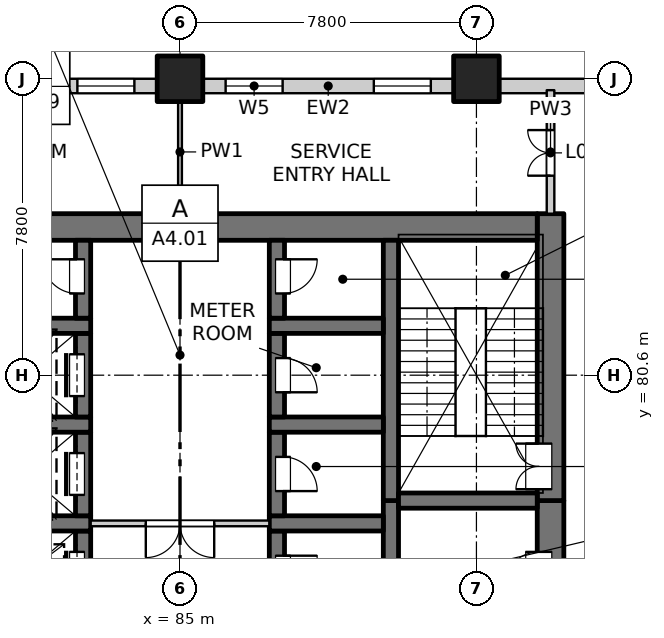
"""IFC4 building model, lengths in metres.
Left out: names, types, materials, properties, quantities, classifications, styles, units other than length and angle.
Written with IfcOpenShell. Run it as: python <this file> out.ifc"""

import sys

from ifc_helpers import new_model, si_unit, direction, frame, frame_2d, origin, origin_2d, place, context, subcontext, project, spatial, rectangle, extrude, element, fill, save


model = new_model("IFC4")
c1 = context("Model", 3, precision=1e-05, world=origin(), true_north=direction((0.0, 1.0)))
c2 = subcontext(c1, "Body", "Model", "MODEL_VIEW")
j1 = project(units=[si_unit("LENGTHUNIT", "METRE"), si_unit("PLANEANGLEUNIT", "RADIAN")], contexts=[c1])
p1 = place(None, origin())
s1 = spatial("IfcSite", under=j1, at=p1, CompositionType="ELEMENT")
p2 = place(p1, origin())
s2 = spatial("IfcBuilding", under=s1, at=p2, CompositionType="ELEMENT")
p3 = place(p2, frame((0.0, 0.0, 10.5)))
s3 = spatial("IfcBuildingStorey", under=s2, at=p3, CompositionType="ELEMENT", Elevation=10.5)
for number, where, z_axis, x_axis in (
    (1, (85.0, 88.4, -0.3), (0.0, 0.0, 1.0), (1.0, 0.0, 0.0)),
    (2, (92.8, 88.4, -0.3), (0.0, 0.0, 1.0), (1.0, 0.0, 0.0)),
):
    element("IfcColumn", number, at=place(p3, frame(where, z_axis=z_axis, x_axis=x_axis)), inside=s3, PredefinedType="COLUMN", context=c2, shape_type="SweptSolid", body=[
        extrude(rectangle(XDim=1.2, YDim=1.2, at=origin_2d()), origin(), (0.0, 0.0, 1.0), 4.45),
    ])
p4 = place(p3, frame((94.75, 61.95, -0.3), z_axis=(0.0, 0.0, 1.0), x_axis=(0.0, 1.0, 0.0)))
e3 = element("IfcWall", 3, at=p4, inside=s3, PredefinedType="SOLIDWALL", context=c2, shape_type="SweptSolid", body=[
    extrude(rectangle(XDim=15.35, YDim=0.7, at=frame_2d((7.675, 0.0))), origin(), (0.0, 0.0, 1.0), 4.45),
])
p5 = place(p4, frame((0.925, 0.0, 0.3)))
e4 = element("IfcOpeningElement", 4, at=p5, cuts=e3, PredefinedType="OPENING", context=c2, shape_type="SweptSolid", body=[
    extrude(rectangle(XDim=0.9, YDim=2.1, at=frame_2d((0.45, 1.05))), frame((0.0, 0.36, 0.0), z_axis=(0.0, -1.0, 0.0), x_axis=(1.0, 0.0, 0.0)), (0.0, 0.0, 1.0), 0.72),
])
p6 = place(p4, frame((3.8, 0.0, 0.3)))
e5 = element("IfcOpeningElement", 5, at=p6, cuts=e3, PredefinedType="OPENING", context=c2, shape_type="SweptSolid", body=[
    extrude(rectangle(XDim=0.9, YDim=2.1, at=frame_2d((0.45, 1.05))), frame((0.0, 0.36, 0.0), z_axis=(0.0, -1.0, 0.0), x_axis=(1.0, 0.0, 0.0)), (0.0, 0.0, 1.0), 0.72),
])
p7 = place(p4, frame((6.8, 0.0, 0.3)))
e6 = element("IfcOpeningElement", 6, at=p7, cuts=e3, PredefinedType="OPENING", context=c2, shape_type="SweptSolid", body=[
    extrude(rectangle(XDim=0.9, YDim=2.1, at=frame_2d((0.45, 1.05))), frame((0.0, 0.36, 0.0), z_axis=(0.0, -1.0, 0.0), x_axis=(1.0, 0.0, 0.0)), (0.0, 0.0, 1.0), 0.72),
])
p8 = place(p4, frame((9.8, 0.0, 0.3)))
e7 = element("IfcOpeningElement", 7, at=p8, cuts=e3, PredefinedType="OPENING", context=c2, shape_type="SweptSolid", body=[
    extrude(rectangle(XDim=0.9, YDim=2.1, at=frame_2d((0.45, 1.05))), frame((0.0, 0.36, 0.0), z_axis=(0.0, -1.0, 0.0), x_axis=(1.0, 0.0, 0.0)), (0.0, 0.0, 1.0), 0.72),
])
p9 = place(p4, frame((13.1, 0.0, 0.3)))
e8 = element("IfcOpeningElement", 8, at=p9, cuts=e3, PredefinedType="OPENING", context=c2, shape_type="SweptSolid", body=[
    extrude(rectangle(XDim=0.9, YDim=2.1, at=frame_2d((0.45, 1.05))), frame((0.0, 0.36, 0.0), z_axis=(0.0, -1.0, 0.0), x_axis=(1.0, 0.0, 0.0)), (0.0, 0.0, 1.0), 0.72),
])
p10 = place(p3, frame((94.75, 77.3, -0.3), z_axis=(0.0, 0.0, 1.0), x_axis=(0.0, 1.0, 0.0)))
e9 = element("IfcWall", 9, at=p10, inside=s3, PredefinedType="SOLIDWALL", context=c2, shape_type="SweptSolid", body=[
    extrude(rectangle(XDim=7.55, YDim=0.7, at=frame_2d((3.775, 0.0))), origin(), (0.0, 0.0, 1.0), 4.45),
])
p11 = place(p10, frame((0.3, 0.0, 0.3)))
e10 = element("IfcOpeningElement", 10, at=p11, cuts=e9, PredefinedType="OPENING", context=c2, shape_type="SweptSolid", body=[
    extrude(rectangle(XDim=1.2, YDim=2.1, at=frame_2d((0.6, 1.05))), frame((0.0, 0.36, 0.0), z_axis=(0.0, -1.0, 0.0), x_axis=(1.0, 0.0, 0.0)), (0.0, 0.0, 1.0), 0.72),
])
p12 = place(p3, frame((75.6, 84.5, -0.3), z_axis=(0.0, 0.0, 1.0), x_axis=(1.0, 0.0, 0.0)))
e11 = element("IfcWall", 11, at=p12, inside=s3, PredefinedType="SOLIDWALL", context=c2, shape_type="SweptSolid", body=[
    extrude(rectangle(XDim=18.8, YDim=0.7, at=frame_2d((9.4, 0.0))), origin(), (0.0, 0.0, 1.0), 4.45),
])
p13 = place(p3, frame((90.55, 61.95, -0.3), z_axis=(0.0, 0.0, 1.0), x_axis=(0.0, 1.0, 0.0)))
e12 = element("IfcWall", 12, at=p13, inside=s3, PredefinedType="SOLIDWALL", context=c2, shape_type="SweptSolid", body=[
    extrude(rectangle(XDim=15.35, YDim=0.4, at=frame_2d((7.675, 0.0))), origin(), (0.0, 0.0, 1.0), 4.45),
])
p14 = place(p3, frame((90.55, 77.3, -0.3), z_axis=(0.0, 0.0, 1.0), x_axis=(0.0, 1.0, 0.0)))
e13 = element("IfcWall", 13, at=p14, inside=s3, PredefinedType="SOLIDWALL", context=c2, shape_type="SweptSolid", body=[
    extrude(rectangle(XDim=6.85, YDim=0.4, at=frame_2d((3.425, 0.0))), origin(), (0.0, 0.0, 1.0), 4.45),
])
p15 = place(p3, frame((82.45, 74.3, -0.3), z_axis=(0.0, 0.0, 1.0), x_axis=(0.0, 1.0, 0.0)))
e14 = element("IfcWall", 14, at=p15, inside=s3, PredefinedType="SOLIDWALL", context=c2, shape_type="SweptSolid", body=[
    extrude(rectangle(XDim=2.2, YDim=0.4, at=frame_2d((1.1, 0.0))), origin(), (0.0, 0.0, 1.0), 4.45),
])
p16 = place(p15, frame((0.55, 0.0, 0.3)))
e15 = element("IfcOpeningElement", 15, at=p16, cuts=e14, PredefinedType="OPENING", context=c2, shape_type="SweptSolid", body=[
    extrude(rectangle(XDim=1.1, YDim=2.1, at=frame_2d((0.55, 1.05))), frame((0.0, 0.21, 0.0), z_axis=(0.0, -1.0, 0.0), x_axis=(1.0, 0.0, 0.0)), (0.0, 0.0, 1.0), 0.42),
])
p17 = place(p3, frame((79.65, 76.7, -0.3), z_axis=(0.0, 0.0, 1.0), x_axis=(1.0, 0.0, 0.0)))
e16 = element("IfcWall", 16, at=p17, inside=s3, PredefinedType="SOLIDWALL", context=c2, shape_type="SweptSolid", body=[
    extrude(rectangle(XDim=3.0, YDim=0.4, at=frame_2d((1.5, 0.0))), origin(), (0.0, 0.0, 1.0), 4.45),
])
p18 = place(p3, frame((82.45, 76.9, -0.3), z_axis=(0.0, 0.0, 1.0), x_axis=(0.0, 1.0, 0.0)))
e17 = element("IfcWall", 17, at=p18, inside=s3, PredefinedType="SOLIDWALL", context=c2, shape_type="SweptSolid", body=[
    extrude(rectangle(XDim=2.2, YDim=0.4, at=frame_2d((1.1, 0.0))), origin(), (0.0, 0.0, 1.0), 4.45),
])
p19 = place(p18, frame((0.55, 0.0, 0.3)))
e18 = element("IfcOpeningElement", 18, at=p19, cuts=e17, PredefinedType="OPENING", context=c2, shape_type="SweptSolid", body=[
    extrude(rectangle(XDim=1.1, YDim=2.1, at=frame_2d((0.55, 1.05))), frame((0.0, 0.21, 0.0), z_axis=(0.0, -1.0, 0.0), x_axis=(1.0, 0.0, 0.0)), (0.0, 0.0, 1.0), 0.42),
])
p20 = place(p3, frame((79.65, 79.3, -0.3), z_axis=(0.0, 0.0, 1.0), x_axis=(1.0, 0.0, 0.0)))
e19 = element("IfcWall", 19, at=p20, inside=s3, PredefinedType="SOLIDWALL", context=c2, shape_type="SweptSolid", body=[
    extrude(rectangle(XDim=3.0, YDim=0.4, at=frame_2d((1.5, 0.0))), origin(), (0.0, 0.0, 1.0), 4.45),
])
p21 = place(p3, frame((82.45, 79.5, -0.3), z_axis=(0.0, 0.0, 1.0), x_axis=(0.0, 1.0, 0.0)))
e20 = element("IfcWall", 20, at=p21, inside=s3, PredefinedType="SOLIDWALL", context=c2, shape_type="SweptSolid", body=[
    extrude(rectangle(XDim=2.2, YDim=0.4, at=frame_2d((1.1, 0.0))), origin(), (0.0, 0.0, 1.0), 4.45),
])
p22 = place(p21, frame((0.55, 0.0, 0.3)))
e21 = element("IfcOpeningElement", 21, at=p22, cuts=e20, PredefinedType="OPENING", context=c2, shape_type="SweptSolid", body=[
    extrude(rectangle(XDim=1.1, YDim=2.1, at=frame_2d((0.55, 1.05))), frame((0.0, 0.21, 0.0), z_axis=(0.0, -1.0, 0.0), x_axis=(1.0, 0.0, 0.0)), (0.0, 0.0, 1.0), 0.42),
])
p23 = place(p3, frame((79.65, 81.9, -0.3), z_axis=(0.0, 0.0, 1.0), x_axis=(1.0, 0.0, 0.0)))
e22 = element("IfcWall", 22, at=p23, inside=s3, PredefinedType="SOLIDWALL", context=c2, shape_type="SweptSolid", body=[
    extrude(rectangle(XDim=3.0, YDim=0.4, at=frame_2d((1.5, 0.0))), origin(), (0.0, 0.0, 1.0), 4.45),
])
p24 = place(p3, frame((82.45, 82.1, -0.3), z_axis=(0.0, 0.0, 1.0), x_axis=(0.0, 1.0, 0.0)))
e23 = element("IfcWall", 23, at=p24, inside=s3, PredefinedType="SOLIDWALL", context=c2, shape_type="SweptSolid", body=[
    extrude(rectangle(XDim=2.05, YDim=0.4, at=frame_2d((1.025, 0.0))), origin(), (0.0, 0.0, 1.0), 4.45),
])
p25 = place(p24, frame((0.65, 0.0, 0.3)))
e24 = element("IfcOpeningElement", 24, at=p25, cuts=e23, PredefinedType="OPENING", context=c2, shape_type="SweptSolid", body=[
    extrude(rectangle(XDim=0.9, YDim=2.1, at=frame_2d((0.45, 1.05))), frame((0.0, 0.21, 0.0), z_axis=(0.0, -1.0, 0.0), x_axis=(1.0, 0.0, 0.0)), (0.0, 0.0, 1.0), 0.42),
])
p26 = place(p3, frame((87.55, 74.3, -0.3), z_axis=(0.0, 0.0, 1.0), x_axis=(0.0, 1.0, 0.0)))
e25 = element("IfcWall", 25, at=p26, inside=s3, PredefinedType="SOLIDWALL", context=c2, shape_type="SweptSolid", body=[
    extrude(rectangle(XDim=2.2, YDim=0.4, at=frame_2d((1.1, 0.0))), origin(), (0.0, 0.0, 1.0), 4.45),
])
p27 = place(p26, frame((0.65, 0.0, 0.3)))
e26 = element("IfcOpeningElement", 26, at=p27, cuts=e25, PredefinedType="OPENING", context=c2, shape_type="SweptSolid", body=[
    extrude(rectangle(XDim=0.9, YDim=2.1, at=frame_2d((0.45, 1.05))), frame((0.0, 0.21, 0.0), z_axis=(0.0, -1.0, 0.0), x_axis=(1.0, 0.0, 0.0)), (0.0, 0.0, 1.0), 0.42),
])
p28 = place(p3, frame((87.35, 76.7, -0.3), z_axis=(0.0, 0.0, 1.0), x_axis=(1.0, 0.0, 0.0)))
e27 = element("IfcWall", 27, at=p28, inside=s3, PredefinedType="SOLIDWALL", context=c2, shape_type="SweptSolid", body=[
    extrude(rectangle(XDim=3.0, YDim=0.4, at=frame_2d((1.5, 0.0))), origin(), (0.0, 0.0, 1.0), 4.45),
])
p29 = place(p3, frame((87.55, 76.9, -0.3), z_axis=(0.0, 0.0, 1.0), x_axis=(0.0, 1.0, 0.0)))
e28 = element("IfcWall", 28, at=p29, inside=s3, PredefinedType="SOLIDWALL", context=c2, shape_type="SweptSolid", body=[
    extrude(rectangle(XDim=2.2, YDim=0.4, at=frame_2d((1.1, 0.0))), origin(), (0.0, 0.0, 1.0), 4.45),
])
p30 = place(p29, frame((0.65, 0.0, 0.3)))
e29 = element("IfcOpeningElement", 29, at=p30, cuts=e28, PredefinedType="OPENING", context=c2, shape_type="SweptSolid", body=[
    extrude(rectangle(XDim=0.9, YDim=2.1, at=frame_2d((0.45, 1.05))), frame((0.0, 0.21, 0.0), z_axis=(0.0, -1.0, 0.0), x_axis=(1.0, 0.0, 0.0)), (0.0, 0.0, 1.0), 0.42),
])
p31 = place(p3, frame((87.35, 79.3, -0.3), z_axis=(0.0, 0.0, 1.0), x_axis=(1.0, 0.0, 0.0)))
e30 = element("IfcWall", 30, at=p31, inside=s3, PredefinedType="SOLIDWALL", context=c2, shape_type="SweptSolid", body=[
    extrude(rectangle(XDim=3.0, YDim=0.4, at=frame_2d((1.5, 0.0))), origin(), (0.0, 0.0, 1.0), 4.45),
])
p32 = place(p3, frame((87.55, 79.5, -0.3), z_axis=(0.0, 0.0, 1.0), x_axis=(0.0, 1.0, 0.0)))
e31 = element("IfcWall", 31, at=p32, inside=s3, PredefinedType="SOLIDWALL", context=c2, shape_type="SweptSolid", body=[
    extrude(rectangle(XDim=2.2, YDim=0.4, at=frame_2d((1.1, 0.0))), origin(), (0.0, 0.0, 1.0), 4.45),
])
p33 = place(p32, frame((0.65, 0.0, 0.3)))
e32 = element("IfcOpeningElement", 32, at=p33, cuts=e31, PredefinedType="OPENING", context=c2, shape_type="SweptSolid", body=[
    extrude(rectangle(XDim=0.9, YDim=2.1, at=frame_2d((0.45, 1.05))), frame((0.0, 0.21, 0.0), z_axis=(0.0, -1.0, 0.0), x_axis=(1.0, 0.0, 0.0)), (0.0, 0.0, 1.0), 0.42),
])
p34 = place(p3, frame((87.35, 81.9, -0.3), z_axis=(0.0, 0.0, 1.0), x_axis=(1.0, 0.0, 0.0)))
e33 = element("IfcWall", 33, at=p34, inside=s3, PredefinedType="SOLIDWALL", context=c2, shape_type="SweptSolid", body=[
    extrude(rectangle(XDim=3.0, YDim=0.4, at=frame_2d((1.5, 0.0))), origin(), (0.0, 0.0, 1.0), 4.45),
])
p35 = place(p3, frame((87.55, 82.1, -0.3), z_axis=(0.0, 0.0, 1.0), x_axis=(0.0, 1.0, 0.0)))
e34 = element("IfcWall", 34, at=p35, inside=s3, PredefinedType="SOLIDWALL", context=c2, shape_type="SweptSolid", body=[
    extrude(rectangle(XDim=2.05, YDim=0.4, at=frame_2d((1.025, 0.0))), origin(), (0.0, 0.0, 1.0), 4.45),
])
p36 = place(p35, frame((0.65, 0.0, 0.3)))
e35 = element("IfcOpeningElement", 35, at=p36, cuts=e34, PredefinedType="OPENING", context=c2, shape_type="SweptSolid", body=[
    extrude(rectangle(XDim=0.9, YDim=2.1, at=frame_2d((0.45, 1.05))), frame((0.0, 0.21, 0.0), z_axis=(0.0, -1.0, 0.0), x_axis=(1.0, 0.0, 0.0)), (0.0, 0.0, 1.0), 0.42),
])
p37 = place(p3, frame((90.75, 77.3, -0.3), z_axis=(0.0, 0.0, 1.0), x_axis=(1.0, 0.0, 0.0)))
e36 = element("IfcWall", 36, at=p37, inside=s3, PredefinedType="SOLIDWALL", context=c2, shape_type="SweptSolid", body=[
    extrude(rectangle(XDim=3.65, YDim=0.4, at=frame_2d((1.825, 0.0))), origin(), (0.0, 0.0, 1.0), 4.45),
])
p38 = place(p3, frame((77.8, 88.21, 0.0), z_axis=(0.0, 0.0, 1.0), x_axis=(1.0, 0.0, 0.0)))
e37 = element("IfcWall", 37, at=p38, inside=s3, PredefinedType="SOLIDWALL", context=c2, shape_type="SweptSolid", body=[
    extrude(rectangle(XDim=6.6, YDim=0.38, at=frame_2d((3.3, 0.0))), origin(), (0.0, 0.0, 1.0), 3.7),
])
p39 = place(p38, frame((0.6, 0.0, 0.9)))
e38 = element("IfcOpeningElement", 38, at=p39, cuts=e37, PredefinedType="OPENING", context=c2, shape_type="SweptSolid", body=[
    extrude(rectangle(XDim=1.5, YDim=1.5, at=frame_2d((0.75, 0.75))), frame((0.0, 0.2, 0.0), z_axis=(0.0, -1.0, 0.0), x_axis=(1.0, 0.0, 0.0)), (0.0, 0.0, 1.0), 0.4),
])
p40 = place(p38, frame((4.5, 0.0, 0.9)))
e39 = element("IfcOpeningElement", 39, at=p40, cuts=e37, PredefinedType="OPENING", context=c2, shape_type="SweptSolid", body=[
    extrude(rectangle(XDim=1.5, YDim=1.5, at=frame_2d((0.75, 0.75))), frame((0.0, 0.2, 0.0), z_axis=(0.0, -1.0, 0.0), x_axis=(1.0, 0.0, 0.0)), (0.0, 0.0, 1.0), 0.4),
])
p41 = place(p3, frame((85.6, 88.21, 0.0), z_axis=(0.0, 0.0, 1.0), x_axis=(1.0, 0.0, 0.0)))
e40 = element("IfcWall", 40, at=p41, inside=s3, PredefinedType="SOLIDWALL", context=c2, shape_type="SweptSolid", body=[
    extrude(rectangle(XDim=6.6, YDim=0.38, at=frame_2d((3.3, 0.0))), origin(), (0.0, 0.0, 1.0), 3.7),
])
p42 = place(p41, frame((0.6, 0.0, 0.9)))
e41 = element("IfcOpeningElement", 41, at=p42, cuts=e40, PredefinedType="OPENING", context=c2, shape_type="SweptSolid", body=[
    extrude(rectangle(XDim=1.5, YDim=1.5, at=frame_2d((0.75, 0.75))), frame((0.0, 0.2, 0.0), z_axis=(0.0, -1.0, 0.0), x_axis=(1.0, 0.0, 0.0)), (0.0, 0.0, 1.0), 0.4),
])
p43 = place(p41, frame((4.5, 0.0, 0.9)))
e42 = element("IfcOpeningElement", 42, at=p43, cuts=e40, PredefinedType="OPENING", context=c2, shape_type="SweptSolid", body=[
    extrude(rectangle(XDim=1.5, YDim=1.5, at=frame_2d((0.75, 0.75))), frame((0.0, 0.2, 0.0), z_axis=(0.0, -1.0, 0.0), x_axis=(1.0, 0.0, 0.0)), (0.0, 0.0, 1.0), 0.4),
])
p44 = place(p3, frame((93.4, 88.21, 0.0), z_axis=(0.0, 0.0, 1.0), x_axis=(1.0, 0.0, 0.0)))
e43 = element("IfcWall", 43, at=p44, inside=s3, PredefinedType="SOLIDWALL", context=c2, shape_type="SweptSolid", body=[
    extrude(rectangle(XDim=6.6, YDim=0.38, at=frame_2d((3.3, 0.0))), origin(), (0.0, 0.0, 1.0), 3.7),
])
p45 = place(p44, frame((4.5, 0.0, 0.9)))
e44 = element("IfcOpeningElement", 44, at=p45, cuts=e43, PredefinedType="OPENING", context=c2, shape_type="SweptSolid", body=[
    extrude(rectangle(XDim=1.5, YDim=1.5, at=frame_2d((0.75, 0.75))), frame((0.0, 0.2, 0.0), z_axis=(0.0, -1.0, 0.0), x_axis=(1.0, 0.0, 0.0)), (0.0, 0.0, 1.0), 0.4),
])
p46 = place(p3, frame((82.65, 76.7, 0.0), z_axis=(0.0, 0.0, 1.0), x_axis=(1.0, 0.0, 0.0)))
e45 = element("IfcWall", 45, at=p46, inside=s3, PredefinedType="PARTITIONING", context=c2, shape_type="SweptSolid", body=[
    extrude(rectangle(XDim=4.7, YDim=0.15, at=frame_2d((2.35, 0.0))), origin(), (0.0, 0.0, 1.0), 4.15),
])
p47 = place(p46, frame((1.45, 0.0, 0.0)))
e46 = element("IfcOpeningElement", 46, at=p47, cuts=e45, PredefinedType="OPENING", context=c2, shape_type="SweptSolid", body=[
    extrude(rectangle(XDim=1.8, YDim=2.1, at=frame_2d((0.9, 1.05))), frame((0.0, 0.085, 0.0), z_axis=(0.0, -1.0, 0.0), x_axis=(1.0, 0.0, 0.0)), (0.0, 0.0, 1.0), 0.17),
])
p48 = place(p3, frame((85.0, 84.85, 0.0), z_axis=(0.0, 0.0, 1.0), x_axis=(0.0, 1.0, 0.0)))
e47 = element("IfcWall", 47, at=p48, inside=s3, PredefinedType="PARTITIONING", context=c2, shape_type="SweptSolid", body=[
    extrude(rectangle(XDim=3.25, YDim=0.1, at=frame_2d((1.625, 0.0))), origin(), (0.0, 0.0, 1.0), 4.15),
])
p49 = place(p3, frame((94.75, 84.85, 0.0), z_axis=(0.0, 0.0, 1.0), x_axis=(0.0, 1.0, 0.0)))
e48 = element("IfcWall", 48, at=p49, inside=s3, PredefinedType="PARTITIONING", context=c2, shape_type="SweptSolid", body=[
    extrude(rectangle(XDim=3.25, YDim=0.2, at=frame_2d((1.625, 0.0))), origin(), (0.0, 0.0, 1.0), 4.15),
])
p50 = place(p49, frame((1.0, 0.0, 0.0)))
e49 = element("IfcOpeningElement", 49, at=p50, cuts=e48, PredefinedType="OPENING", context=c2, shape_type="SweptSolid", body=[
    extrude(rectangle(XDim=1.2, YDim=2.1, at=frame_2d((0.6, 1.05))), frame((0.0, 0.11, 0.0), z_axis=(0.0, -1.0, 0.0), x_axis=(1.0, 0.0, 0.0)), (0.0, 0.0, 1.0), 0.22),
])
p51 = place(p40, origin())
e50 = element("IfcWindow", 50, at=p51, inside=s3, PartitioningType="SINGLE_PANEL", PredefinedType="WINDOW", context=c2, shape_type="SweptSolid", body=[
    extrude(rectangle(XDim=1.5, YDim=1.5, at=frame_2d((0.75, 0.75))), frame((0.0, 0.03, 0.0), z_axis=(0.0, -1.0, 0.0), x_axis=(1.0, 0.0, 0.0)), (0.0, 0.0, 1.0), 0.06),
])
fill(e39, e50)
p52 = place(p42, origin())
e51 = element("IfcWindow", 51, at=p52, inside=s3, PartitioningType="SINGLE_PANEL", PredefinedType="WINDOW", context=c2, shape_type="SweptSolid", body=[
    extrude(rectangle(XDim=1.5, YDim=1.5, at=frame_2d((0.75, 0.75))), frame((0.0, 0.03, 0.0), z_axis=(0.0, -1.0, 0.0), x_axis=(1.0, 0.0, 0.0)), (0.0, 0.0, 1.0), 0.06),
])
fill(e41, e51)
p53 = place(p43, origin())
e52 = element("IfcWindow", 52, at=p53, inside=s3, PartitioningType="SINGLE_PANEL", PredefinedType="WINDOW", context=c2, shape_type="SweptSolid", body=[
    extrude(rectangle(XDim=1.5, YDim=1.5, at=frame_2d((0.75, 0.75))), frame((0.0, 0.03, 0.0), z_axis=(0.0, -1.0, 0.0), x_axis=(1.0, 0.0, 0.0)), (0.0, 0.0, 1.0), 0.06),
])
fill(e42, e52)
p54 = place(p16, origin())
e53 = element("IfcDoor", 53, at=p54, inside=s3, OperationType="SLIDING_TO_LEFT", PredefinedType="DOOR", context=c2, shape_type="SweptSolid", body=[
    extrude(rectangle(XDim=1.1, YDim=2.1, at=frame_2d((0.55, 1.05))), frame((0.0, 0.185, 0.0), z_axis=(0.0, -1.0, 0.0), x_axis=(1.0, 0.0, 0.0)), (0.0, 0.0, 1.0), 0.05),
])
fill(e15, e53)
p55 = place(p27, origin())
e54 = element("IfcDoor", 54, at=p55, inside=s3, OperationType="SINGLE_SWING_LEFT", PredefinedType="DOOR", context=c2, shape_type="SweptSolid", body=[
    extrude(rectangle(XDim=0.9, YDim=2.1, at=frame_2d((0.45, 1.05))), frame((0.0, -0.135, 0.0), z_axis=(0.0, -1.0, 0.0), x_axis=(1.0, 0.0, 0.0)), (0.0, 0.0, 1.0), 0.05),
])
fill(e26, e54)
p56 = place(p9, origin())
e55 = element("IfcDoor", 55, at=p56, inside=s3, OperationType="SINGLE_SWING_LEFT", PredefinedType="DOOR", context=c2, shape_type="SweptSolid", body=[
    extrude(rectangle(XDim=0.9, YDim=2.1, at=frame_2d((0.45, 1.05))), frame((0.0, 0.335, 0.0), z_axis=(0.0, -1.0, 0.0), x_axis=(1.0, 0.0, 0.0)), (0.0, 0.0, 1.0), 0.05),
])
fill(e8, e55)
p57 = place(p47, origin())
e56 = element("IfcDoor", 56, at=p57, inside=s3, OperationType="DOUBLE_DOOR_SINGLE_SWING", PredefinedType="DOOR", context=c2, shape_type="SweptSolid", body=[
    extrude(rectangle(XDim=1.8, YDim=2.1, at=frame_2d((0.9, 1.05))), frame((0.0, 0.025, 0.0), z_axis=(0.0, -1.0, 0.0), x_axis=(1.0, 0.0, 0.0)), (0.0, 0.0, 1.0), 0.05),
])
fill(e46, e56)
p58 = place(p19, origin())
e57 = element("IfcDoor", 57, at=p58, inside=s3, OperationType="SLIDING_TO_LEFT", PredefinedType="DOOR", context=c2, shape_type="SweptSolid", body=[
    extrude(rectangle(XDim=1.1, YDim=2.1, at=frame_2d((0.55, 1.05))), frame((0.0, 0.185, 0.0), z_axis=(0.0, -1.0, 0.0), x_axis=(1.0, 0.0, 0.0)), (0.0, 0.0, 1.0), 0.05),
])
fill(e18, e57)
p59 = place(p30, origin())
e58 = element("IfcDoor", 58, at=p59, inside=s3, OperationType="SINGLE_SWING_RIGHT", PredefinedType="DOOR", context=c2, shape_type="SweptSolid", body=[
    extrude(rectangle(XDim=0.9, YDim=2.1, at=frame_2d((0.45, 1.05))), frame((0.0, -0.135, 0.0), z_axis=(0.0, -1.0, 0.0), x_axis=(1.0, 0.0, 0.0)), (0.0, 0.0, 1.0), 0.05),
])
fill(e29, e58)
p60 = place(p11, origin())
e59 = element("IfcDoor", 59, at=p60, inside=s3, OperationType="DOUBLE_DOOR_SINGLE_SWING", PredefinedType="DOOR", context=c2, shape_type="SweptSolid", body=[
    extrude(rectangle(XDim=1.2, YDim=2.1, at=frame_2d((0.6, 1.05))), frame((0.0, 0.335, 0.0), z_axis=(0.0, -1.0, 0.0), x_axis=(1.0, 0.0, 0.0)), (0.0, 0.0, 1.0), 0.05),
])
fill(e10, e59)
p61 = place(p22, origin())
e60 = element("IfcDoor", 60, at=p61, inside=s3, OperationType="SLIDING_TO_LEFT", PredefinedType="DOOR", context=c2, shape_type="SweptSolid", body=[
    extrude(rectangle(XDim=1.1, YDim=2.1, at=frame_2d((0.55, 1.05))), frame((0.0, 0.185, 0.0), z_axis=(0.0, -1.0, 0.0), x_axis=(1.0, 0.0, 0.0)), (0.0, 0.0, 1.0), 0.05),
])
fill(e21, e60)
p62 = place(p33, origin())
e61 = element("IfcDoor", 61, at=p62, inside=s3, OperationType="SINGLE_SWING_RIGHT", PredefinedType="DOOR", context=c2, shape_type="SweptSolid", body=[
    extrude(rectangle(XDim=0.9, YDim=2.1, at=frame_2d((0.45, 1.05))), frame((0.0, -0.135, 0.0), z_axis=(0.0, -1.0, 0.0), x_axis=(1.0, 0.0, 0.0)), (0.0, 0.0, 1.0), 0.05),
])
fill(e32, e61)
p63 = place(p25, origin())
e62 = element("IfcDoor", 62, at=p63, inside=s3, OperationType="SINGLE_SWING_RIGHT", PredefinedType="DOOR", context=c2, shape_type="SweptSolid", body=[
    extrude(rectangle(XDim=0.9, YDim=2.1, at=frame_2d((0.45, 1.05))), frame((0.0, 0.185, 0.0), z_axis=(0.0, -1.0, 0.0), x_axis=(1.0, 0.0, 0.0)), (0.0, 0.0, 1.0), 0.05),
])
fill(e24, e62)
p64 = place(p36, origin())
e63 = element("IfcDoor", 63, at=p64, inside=s3, OperationType="SINGLE_SWING_LEFT", PredefinedType="DOOR", context=c2, shape_type="SweptSolid", body=[
    extrude(rectangle(XDim=0.9, YDim=2.1, at=frame_2d((0.45, 1.05))), frame((0.0, -0.135, 0.0), z_axis=(0.0, -1.0, 0.0), x_axis=(1.0, 0.0, 0.0)), (0.0, 0.0, 1.0), 0.05),
])
fill(e35, e63)
p65 = place(p50, origin())
e64 = element("IfcDoor", 64, at=p65, inside=s3, OperationType="DOUBLE_DOOR_SINGLE_SWING", PredefinedType="DOOR", context=c2, shape_type="SweptSolid", body=[
    extrude(rectangle(XDim=1.2, YDim=2.1, at=frame_2d((0.6, 1.05))), frame((0.0, 0.025, 0.0), z_axis=(0.0, -1.0, 0.0), x_axis=(1.0, 0.0, 0.0)), (0.0, 0.0, 1.0), 0.05),
])
fill(e49, e64)
save(model, sys.argv[1])
